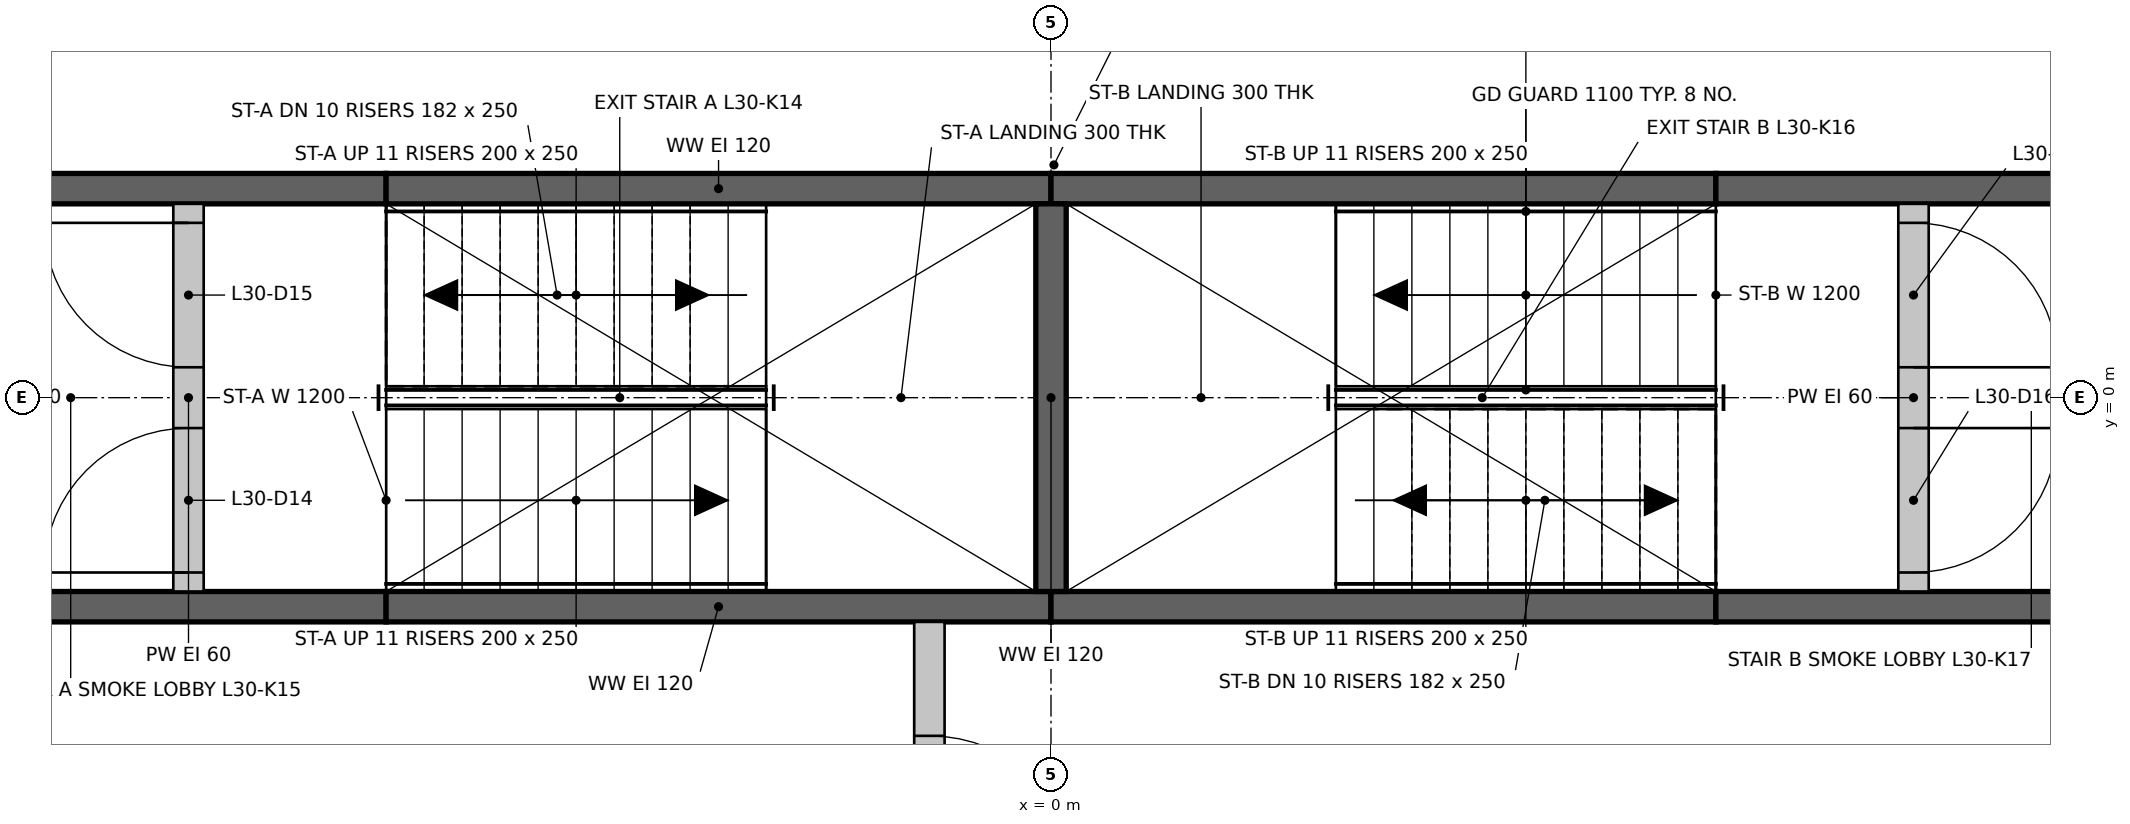
"""IFC4 building model, lengths in metres.
Left out: names, types, materials, properties, quantities, classifications, styles, units other than length and angle.
Written with IfcOpenShell. Run it as: python <this file> out.ifc"""

import sys

from ifc_helpers import new_model, si_unit, direction, frame, frame_2d, origin, place, context, subcontext, project, spatial, rectangle, extrude, element, fill, save


model = new_model("IFC4")
c1 = context("Model", 3, precision=1e-05, world=origin(), true_north=direction((0.0, 1.0)))
c2 = subcontext(c1, "Body", "Model", "MODEL_VIEW")
j1 = project(units=[si_unit("LENGTHUNIT", "METRE"), si_unit("PLANEANGLEUNIT", "RADIAN")], contexts=[c1])
p1 = place(None, origin())
s1 = spatial("IfcSite", under=j1, at=p1, CompositionType="ELEMENT")
p2 = place(p1, origin())
s2 = spatial("IfcBuilding", under=s1, at=p2, CompositionType="ELEMENT")
p3 = place(p2, frame((0.0, 0.0, 116.55)))
s3 = spatial("IfcBuildingStorey", under=s2, at=p3, CompositionType="ELEMENT", Elevation=116.55)
p4 = place(p3, frame((-7.124, -1.375, 0.0), z_axis=(0.0, 0.0, 1.0), x_axis=(1.0, 0.0, 0.0)))
e1 = element("IfcWall", 1, at=p4, inside=s3, PredefinedType="SHEAR", context=c2, shape_type="SweptSolid", body=[
    extrude(rectangle(XDim=2.75, YDim=0.2, at=frame_2d((1.375, 0.0))), origin(), (0.0, 0.0, 1.0), 4.05),
])
for number, where, z_axis, x_axis in (
    (2, (-4.374, -1.375, 0.0), (0.0, 0.0, 1.0), (1.0, 0.0, 0.0)),
    (3, (0.0, -1.375, 0.0), (0.0, 0.0, 1.0), (1.0, 0.0, 0.0)),
):
    element("IfcWall", number, at=place(p3, frame(where, z_axis=z_axis, x_axis=x_axis)), inside=s3, PredefinedType="SHEAR", context=c2, shape_type="SweptSolid", body=[
        extrude(rectangle(XDim=4.374, YDim=0.2, at=frame_2d((2.187, 0.0))), origin(), (0.0, 0.0, 1.0), 4.05),
    ])
for number, where, z_axis, x_axis in (
    (4, (4.374, -1.375, 0.0), (0.0, 0.0, 1.0), (1.0, 0.0, 0.0)),
    (5, (-7.124, 1.375, 0.0), (0.0, 0.0, 1.0), (1.0, 0.0, 0.0)),
):
    element("IfcWall", number, at=place(p3, frame(where, z_axis=z_axis, x_axis=x_axis)), inside=s3, PredefinedType="SHEAR", context=c2, shape_type="SweptSolid", body=[
        extrude(rectangle(XDim=2.75, YDim=0.2, at=frame_2d((1.375, 0.0))), origin(), (0.0, 0.0, 1.0), 4.05),
    ])
for number, where, z_axis, x_axis in (
    (6, (-4.374, 1.375, 0.0), (0.0, 0.0, 1.0), (1.0, 0.0, 0.0)),
    (7, (0.0, 1.375, 0.0), (0.0, 0.0, 1.0), (1.0, 0.0, 0.0)),
):
    element("IfcWall", number, at=place(p3, frame(where, z_axis=z_axis, x_axis=x_axis)), inside=s3, PredefinedType="SHEAR", context=c2, shape_type="SweptSolid", body=[
        extrude(rectangle(XDim=4.374, YDim=0.2, at=frame_2d((2.187, 0.0))), origin(), (0.0, 0.0, 1.0), 4.05),
    ])
p5 = place(p3, frame((4.374, 1.375, 0.0), z_axis=(0.0, 0.0, 1.0), x_axis=(1.0, 0.0, 0.0)))
e8 = element("IfcWall", 8, at=p5, inside=s3, PredefinedType="SHEAR", context=c2, shape_type="SweptSolid", body=[
    extrude(rectangle(XDim=2.75, YDim=0.2, at=frame_2d((1.375, 0.0))), origin(), (0.0, 0.0, 1.0), 4.05),
])
p6 = place(p3, frame((0.0, -1.275, 0.0), z_axis=(0.0, 0.0, 1.0), x_axis=(0.0, 1.0, 0.0)))
e9 = element("IfcWall", 9, at=p6, inside=s3, PredefinedType="SHEAR", context=c2, shape_type="SweptSolid", body=[
    extrude(rectangle(XDim=2.55, YDim=0.2, at=frame_2d((1.275, 0.0))), origin(), (0.0, 0.0, 1.0), 4.05),
])
p7 = place(p3, frame((-0.8, -3.974, 0.0), z_axis=(0.0, 0.0, 1.0), x_axis=(0.0, 1.0, 0.0)))
e10 = element("IfcWall", 10, at=p7, inside=s3, PredefinedType="PARTITIONING", context=c2, shape_type="SweptSolid", body=[
    extrude(rectangle(XDim=2.499, YDim=0.2, at=frame_2d((1.25, 0.0))), origin(), (0.0, 0.0, 1.0), 4.05),
])
p8 = place(p7, frame((0.75, 0.0, 0.0)))
e11 = element("IfcOpeningElement", 11, at=p8, cuts=e10, PredefinedType="OPENING", context=c2, shape_type="SweptSolid", body=[
    extrude(rectangle(XDim=1.0, YDim=2.1, at=frame_2d((0.5, 1.05))), frame((0.0, 0.11, 0.0), z_axis=(0.0, -1.0, 0.0), x_axis=(1.0, 0.0, 0.0)), (0.0, 0.0, 1.0), 0.22),
])
p9 = place(p3, frame((-5.674, -1.275, 0.0), z_axis=(0.0, 0.0, 1.0), x_axis=(0.0, 1.0, 0.0)))
e12 = element("IfcWall", 12, at=p9, inside=s3, PredefinedType="PARTITIONING", context=c2, shape_type="SweptSolid", body=[
    extrude(rectangle(XDim=2.55, YDim=0.2, at=frame_2d((1.275, 0.0))), origin(), (0.0, 0.0, 1.0), 4.05),
])
p10 = place(p9, frame((0.125, 0.0, 0.0)))
e13 = element("IfcOpeningElement", 13, at=p10, cuts=e12, PredefinedType="OPENING", context=c2, shape_type="SweptSolid", body=[
    extrude(rectangle(XDim=0.95, YDim=2.1, at=frame_2d((0.475, 1.05))), frame((0.0, 0.11, 0.0), z_axis=(0.0, -1.0, 0.0), x_axis=(1.0, 0.0, 0.0)), (0.0, 0.0, 1.0), 0.22),
])
p11 = place(p9, frame((1.475, 0.0, 0.0)))
e14 = element("IfcOpeningElement", 14, at=p11, cuts=e12, PredefinedType="OPENING", context=c2, shape_type="SweptSolid", body=[
    extrude(rectangle(XDim=0.95, YDim=2.1, at=frame_2d((0.475, 1.05))), frame((0.0, 0.11, 0.0), z_axis=(0.0, -1.0, 0.0), x_axis=(1.0, 0.0, 0.0)), (0.0, 0.0, 1.0), 0.22),
])
p12 = place(p3, frame((5.674, -1.275, 0.0), z_axis=(0.0, 0.0, 1.0), x_axis=(0.0, 1.0, 0.0)))
e15 = element("IfcWall", 15, at=p12, inside=s3, PredefinedType="PARTITIONING", context=c2, shape_type="SweptSolid", body=[
    extrude(rectangle(XDim=2.55, YDim=0.2, at=frame_2d((1.275, 0.0))), origin(), (0.0, 0.0, 1.0), 4.05),
])
p13 = place(p12, frame((0.125, 0.0, 0.0)))
e16 = element("IfcOpeningElement", 16, at=p13, cuts=e15, PredefinedType="OPENING", context=c2, shape_type="SweptSolid", body=[
    extrude(rectangle(XDim=0.95, YDim=2.1, at=frame_2d((0.475, 1.05))), frame((0.0, 0.11, 0.0), z_axis=(0.0, -1.0, 0.0), x_axis=(1.0, 0.0, 0.0)), (0.0, 0.0, 1.0), 0.22),
])
p14 = place(p12, frame((1.475, 0.0, 0.0)))
e17 = element("IfcOpeningElement", 17, at=p14, cuts=e15, PredefinedType="OPENING", context=c2, shape_type="SweptSolid", body=[
    extrude(rectangle(XDim=0.95, YDim=2.1, at=frame_2d((0.475, 1.05))), frame((0.0, 0.11, 0.0), z_axis=(0.0, -1.0, 0.0), x_axis=(1.0, 0.0, 0.0)), (0.0, 0.0, 1.0), 0.22),
])
p15 = place(p10, origin())
e18 = element("IfcDoor", 18, at=p15, inside=s3, OperationType="SINGLE_SWING_LEFT", PredefinedType="DOOR", context=c2, shape_type="SweptSolid", body=[
    extrude(rectangle(XDim=0.95, YDim=2.1, at=frame_2d((0.475, 1.05))), frame((0.0, 0.025, 0.0), z_axis=(0.0, -1.0, 0.0), x_axis=(1.0, 0.0, 0.0)), (0.0, 0.0, 1.0), 0.05),
])
fill(e13, e18)
p16 = place(p11, origin())
e19 = element("IfcDoor", 19, at=p16, inside=s3, OperationType="SINGLE_SWING_RIGHT", PredefinedType="DOOR", context=c2, shape_type="SweptSolid", body=[
    extrude(rectangle(XDim=0.95, YDim=2.1, at=frame_2d((0.475, 1.05))), frame((0.0, 0.025, 0.0), z_axis=(0.0, -1.0, 0.0), x_axis=(1.0, 0.0, 0.0)), (0.0, 0.0, 1.0), 0.05),
])
fill(e14, e19)
p17 = place(p13, frame((0.95, 0.0, 0.0), z_axis=(0.0, 0.0, 1.0), x_axis=(-1.0, 0.0, 0.0)))
e20 = element("IfcDoor", 20, at=p17, inside=s3, OperationType="SINGLE_SWING_RIGHT", PredefinedType="DOOR", context=c2, shape_type="SweptSolid", body=[
    extrude(rectangle(XDim=0.95, YDim=2.1, at=frame_2d((0.475, 1.05))), frame((0.0, 0.025, 0.0), z_axis=(0.0, -1.0, 0.0), x_axis=(1.0, 0.0, 0.0)), (0.0, 0.0, 1.0), 0.05),
])
fill(e16, e20)
p18 = place(p14, frame((0.95, 0.0, 0.0), z_axis=(0.0, 0.0, 1.0), x_axis=(-1.0, 0.0, 0.0)))
e21 = element("IfcDoor", 21, at=p18, inside=s3, OperationType="SINGLE_SWING_LEFT", PredefinedType="DOOR", context=c2, shape_type="SweptSolid", body=[
    extrude(rectangle(XDim=0.95, YDim=2.1, at=frame_2d((0.475, 1.05))), frame((0.0, 0.025, 0.0), z_axis=(0.0, -1.0, 0.0), x_axis=(1.0, 0.0, 0.0)), (0.0, 0.0, 1.0), 0.05),
])
fill(e17, e21)
p19 = place(p8, frame((1.0, 0.0, 0.0), z_axis=(0.0, 0.0, 1.0), x_axis=(-1.0, 0.0, 0.0)))
e22 = element("IfcDoor", 22, at=p19, inside=s3, OperationType="SINGLE_SWING_LEFT", PredefinedType="DOOR", context=c2, shape_type="SweptSolid", body=[
    extrude(rectangle(XDim=1.0, YDim=2.1, at=frame_2d((0.5, 1.05))), frame((0.0, 0.025, 0.0), z_axis=(0.0, -1.0, 0.0), x_axis=(1.0, 0.0, 0.0)), (0.0, 0.0, 1.0), 0.05),
])
fill(e11, e22)
save(model, sys.argv[1])
